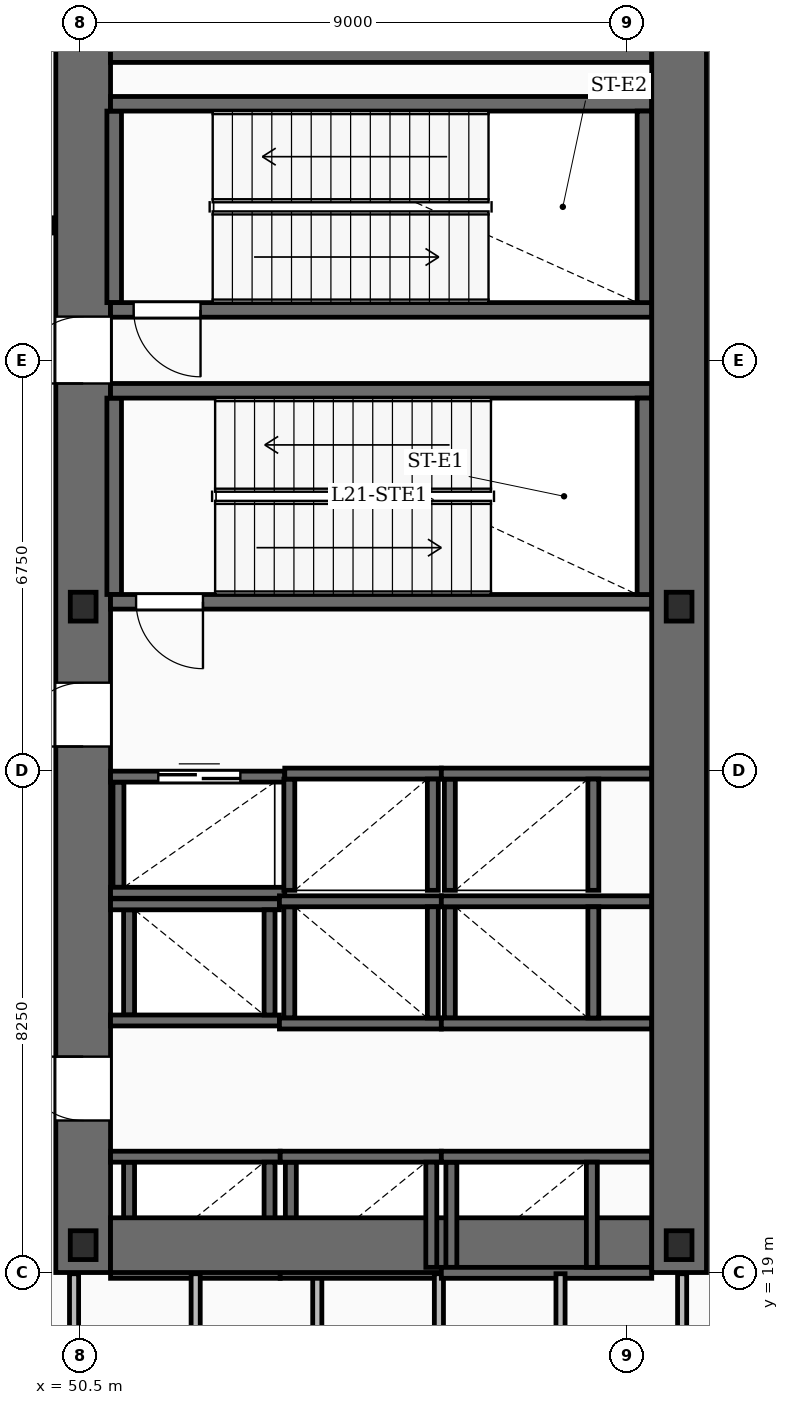
"""IFC4 building model, lengths in metres.
Left out: names, types, materials, properties, quantities, classifications, styles, units other than length and angle.
Written with IfcOpenShell. Run it as: python <this file> out.ifc"""

import sys

from ifc_helpers import new_model, si_unit, direction, frame, frame_2d, origin, origin_2d, place, context, subcontext, project, spatial, rectangle, i_section, extrude, element, fill, save


model = new_model("IFC4")
c1 = context("Model", 3, precision=1e-05, world=origin(), true_north=direction((0.0, 1.0)))
c2 = subcontext(c1, "Body", "Model", "MODEL_VIEW")
j1 = project(units=[si_unit("LENGTHUNIT", "METRE"), si_unit("PLANEANGLEUNIT", "RADIAN")], contexts=[c1])
p1 = place(None, origin())
s1 = spatial("IfcSite", under=j1, at=p1, CompositionType="ELEMENT")
p2 = place(p1, origin())
s2 = spatial("IfcBuilding", under=s1, at=p2, CompositionType="ELEMENT")
p3 = place(p2, frame((0.0, 0.0, 94.5)))
s3 = spatial("IfcBuildingStorey", under=s2, at=p3, CompositionType="ELEMENT", Elevation=94.5)
p4 = place(p3, frame((50.55, 19.0, -0.42), z_axis=(0.0, 0.0, 1.0), x_axis=(0.0, 1.0, 0.0)))
e1 = element("IfcWall", 1, at=p4, inside=s3, PredefinedType="SHEAR", context=c2, shape_type="SweptSolid", body=[
    extrude(rectangle(XDim=20.8, YDim=0.9, at=frame_2d((10.4, 0.0))), origin(), (0.0, 0.0, 1.0), 5.17),
])
p5 = place(p4, frame((2.5, 0.0, 0.42)))
e2 = element("IfcOpeningElement", 2, at=p5, cuts=e1, PredefinedType="OPENING", context=c2, shape_type="SweptSolid", body=[
    extrude(rectangle(XDim=1.05, YDim=2.15, at=frame_2d((0.525, 1.075))), frame((0.0, 0.46, 0.0), z_axis=(0.0, -1.0, 0.0), x_axis=(1.0, 0.0, 0.0)), (0.0, 0.0, 1.0), 0.92),
])
p6 = place(p4, frame((8.65, 0.0, 0.42)))
e3 = element("IfcOpeningElement", 3, at=p6, cuts=e1, PredefinedType="OPENING", context=c2, shape_type="SweptSolid", body=[
    extrude(rectangle(XDim=1.05, YDim=2.15, at=frame_2d((0.525, 1.075))), frame((0.0, 0.46, 0.0), z_axis=(0.0, -1.0, 0.0), x_axis=(1.0, 0.0, 0.0)), (0.0, 0.0, 1.0), 0.92),
])
p7 = place(p4, frame((14.62, 0.0, 0.42)))
e4 = element("IfcOpeningElement", 4, at=p7, cuts=e1, PredefinedType="OPENING", context=c2, shape_type="SweptSolid", body=[
    extrude(rectangle(XDim=1.1, YDim=2.15, at=frame_2d((0.55, 1.075))), frame((0.0, 0.46, 0.0), z_axis=(0.0, -1.0, 0.0), x_axis=(1.0, 0.0, 0.0)), (0.0, 0.0, 1.0), 0.92),
])
p8 = place(p3, frame((60.35, 19.0, -0.42), z_axis=(0.0, 0.0, 1.0), x_axis=(0.0, 1.0, 0.0)))
e5 = element("IfcWall", 5, at=p8, inside=s3, PredefinedType="SHEAR", context=c2, shape_type="SweptSolid", body=[
    extrude(rectangle(XDim=20.8, YDim=0.9, at=frame_2d((10.4, 0.0))), origin(), (0.0, 0.0, 1.0), 5.17),
])
for number, where, z_axis, x_axis in (
    (6, (51.0, 19.45, -0.42), (0.0, 0.0, 1.0), (1.0, 0.0, 0.0)),
    (7, (51.0, 39.35, -0.42), (0.0, 0.0, 1.0), (1.0, 0.0, 0.0)),
):
    element("IfcWall", number, at=place(p3, frame(where, z_axis=z_axis, x_axis=x_axis)), inside=s3, PredefinedType="SHEAR", context=c2, shape_type="SweptSolid", body=[
        extrude(rectangle(XDim=8.9, YDim=0.9, at=frame_2d((4.45, 0.0))), origin(), (0.0, 0.0, 1.0), 5.17),
    ])
for number, where, z_axis, x_axis in (
    (8, (50.55, 19.45, -0.42), (0.0, 0.0, 1.0), (1.0, 0.0, 0.0)),
    (9, (60.35, 19.45, -0.42), (0.0, 0.0, 1.0), (1.0, 0.0, 0.0)),
    (10, (50.55, 29.95, -0.42), (0.0, 0.0, 1.0), (1.0, 0.0, 0.0)),
    (11, (60.35, 29.95, -0.42), (0.0, 0.0, 1.0), (1.0, 0.0, 0.0)),
):
    element("IfcColumn", number, at=place(p3, frame(where, z_axis=z_axis, x_axis=x_axis)), inside=s3, PredefinedType="COLUMN", context=c2, shape_type="SweptSolid", body=[
        extrude(i_section(OverallWidth=0.424, OverallDepth=0.474, WebThickness=0.048, FlangeThickness=0.077, FilletRadius=0.02, at=origin_2d()), origin(), (0.0, 0.0, 1.0), 5.17),
    ])
p9 = place(p3, frame((59.9, 30.03, 0.0), z_axis=(0.0, 0.0, 1.0), x_axis=(-1.0, 0.0, 0.0)))
e12 = element("IfcWall", 12, at=p9, inside=s3, PredefinedType="SOLIDWALL", context=c2, shape_type="SweptSolid", body=[
    extrude(rectangle(XDim=8.9, YDim=0.24, at=frame_2d((4.45, 0.0))), origin(), (0.0, 0.0, 1.0), 4.75),
])
p10 = place(p9, frame((7.38, 0.0, 0.0)))
e13 = element("IfcOpeningElement", 13, at=p10, cuts=e12, PredefinedType="OPENING", context=c2, shape_type="SweptSolid", body=[
    extrude(rectangle(XDim=1.1, YDim=2.15, at=frame_2d((0.55, 1.075))), frame((0.0, 0.13, 0.0), z_axis=(0.0, -1.0, 0.0), x_axis=(1.0, 0.0, 0.0)), (0.0, 0.0, 1.0), 0.26),
])
p11 = place(p3, frame((51.0, 33.5, 0.0), z_axis=(0.0, 0.0, 1.0), x_axis=(1.0, 0.0, 0.0)))
e14 = element("IfcWall", 14, at=p11, inside=s3, PredefinedType="SOLIDWALL", context=c2, shape_type="SweptSolid", body=[
    extrude(rectangle(XDim=8.9, YDim=0.24, at=frame_2d((4.45, 0.0))), origin(), (0.0, 0.0, 1.0), 4.75),
])
for number, where, z_axis, x_axis in (
    (15, (51.06, 30.15, 0.0), (0.0, 0.0, 1.0), (0.0, 1.0, 0.0)),
    (16, (59.78, 30.15, 0.0), (0.0, 0.0, 1.0), (0.0, 1.0, 0.0)),
):
    element("IfcWall", number, at=place(p3, frame(where, z_axis=z_axis, x_axis=x_axis)), inside=s3, PredefinedType="SOLIDWALL", context=c2, shape_type="SweptSolid", body=[
        extrude(rectangle(XDim=3.23, YDim=0.24, at=frame_2d((1.615, 0.0))), origin(), (0.0, 0.0, 1.0), 4.75),
    ])
p12 = place(p3, frame((59.9, 34.83, 0.0), z_axis=(0.0, 0.0, 1.0), x_axis=(-1.0, 0.0, 0.0)))
e17 = element("IfcWall", 17, at=p12, inside=s3, PredefinedType="SOLIDWALL", context=c2, shape_type="SweptSolid", body=[
    extrude(rectangle(XDim=8.9, YDim=0.24, at=frame_2d((4.45, 0.0))), origin(), (0.0, 0.0, 1.0), 4.75),
])
p13 = place(p12, frame((7.42, 0.0, 0.0)))
e18 = element("IfcOpeningElement", 18, at=p13, cuts=e17, PredefinedType="OPENING", context=c2, shape_type="SweptSolid", body=[
    extrude(rectangle(XDim=1.1, YDim=2.15, at=frame_2d((0.55, 1.075))), frame((0.0, 0.13, 0.0), z_axis=(0.0, -1.0, 0.0), x_axis=(1.0, 0.0, 0.0)), (0.0, 0.0, 1.0), 0.26),
])
p14 = place(p3, frame((51.0, 38.22, 0.0), z_axis=(0.0, 0.0, 1.0), x_axis=(1.0, 0.0, 0.0)))
e19 = element("IfcWall", 19, at=p14, inside=s3, PredefinedType="SOLIDWALL", context=c2, shape_type="SweptSolid", body=[
    extrude(rectangle(XDim=8.9, YDim=0.24, at=frame_2d((4.45, 0.0))), origin(), (0.0, 0.0, 1.0), 4.75),
])
for number, where, z_axis, x_axis in (
    (20, (51.06, 34.95, 0.0), (0.0, 0.0, 1.0), (0.0, 1.0, 0.0)),
    (21, (59.78, 34.95, 0.0), (0.0, 0.0, 1.0), (0.0, 1.0, 0.0)),
):
    element("IfcWall", number, at=place(p3, frame(where, z_axis=z_axis, x_axis=x_axis)), inside=s3, PredefinedType="SOLIDWALL", context=c2, shape_type="SweptSolid", body=[
        extrude(rectangle(XDim=3.15, YDim=0.24, at=frame_2d((1.575, 0.0))), origin(), (0.0, 0.0, 1.0), 4.75),
    ])
for number, where, z_axis, x_axis in (
    (22, (51.0, 20.905, 0.0), (0.0, 0.0, 1.0), (1.0, 0.0, 0.0)),
    (23, (51.0, 18.995, 0.0), (0.0, 0.0, 1.0), (1.0, 0.0, 0.0)),
):
    element("IfcWall", number, at=place(p3, frame(where, z_axis=z_axis, x_axis=x_axis)), inside=s3, PredefinedType="SOLIDWALL", context=c2, shape_type="SweptSolid", body=[
        extrude(rectangle(XDim=2.79, YDim=0.18, at=frame_2d((1.395, 0.0))), origin(), (0.0, 0.0, 1.0), 4.75),
    ])
for number, where, z_axis, x_axis in (
    (24, (51.305, 19.085, 0.0), (0.0, 0.0, 1.0), (0.0, 1.0, 0.0)),
    (25, (53.615, 19.085, 0.0), (0.0, 0.0, 1.0), (0.0, 1.0, 0.0)),
):
    element("IfcWall", number, at=place(p3, frame(where, z_axis=z_axis, x_axis=x_axis)), inside=s3, PredefinedType="SOLIDWALL", context=c2, shape_type="SweptSolid", body=[
        extrude(rectangle(XDim=1.73, YDim=0.18, at=frame_2d((0.865, 0.0))), origin(), (0.0, 0.0, 1.0), 4.75),
    ])
for number, where, z_axis, x_axis in (
    (26, (53.79, 20.905, 0.0), (0.0, 0.0, 1.0), (1.0, 0.0, 0.0)),
    (27, (53.79, 18.995, 0.0), (0.0, 0.0, 1.0), (1.0, 0.0, 0.0)),
):
    element("IfcWall", number, at=place(p3, frame(where, z_axis=z_axis, x_axis=x_axis)), inside=s3, PredefinedType="SOLIDWALL", context=c2, shape_type="SweptSolid", body=[
        extrude(rectangle(XDim=2.65, YDim=0.18, at=frame_2d((1.325, 0.0))), origin(), (0.0, 0.0, 1.0), 4.75),
    ])
for number, where, z_axis, x_axis in (
    (28, (53.965, 19.085, 0.0), (0.0, 0.0, 1.0), (0.0, 1.0, 0.0)),
    (29, (56.275, 19.085, 0.0), (0.0, 0.0, 1.0), (0.0, 1.0, 0.0)),
):
    element("IfcWall", number, at=place(p3, frame(where, z_axis=z_axis, x_axis=x_axis)), inside=s3, PredefinedType="SOLIDWALL", context=c2, shape_type="SweptSolid", body=[
        extrude(rectangle(XDim=1.73, YDim=0.18, at=frame_2d((0.865, 0.0))), origin(), (0.0, 0.0, 1.0), 4.75),
    ])
for number, where, z_axis, x_axis in (
    (30, (56.44, 20.905, 0.0), (0.0, 0.0, 1.0), (1.0, 0.0, 0.0)),
    (31, (56.44, 18.995, 0.0), (0.0, 0.0, 1.0), (1.0, 0.0, 0.0)),
):
    element("IfcWall", number, at=place(p3, frame(where, z_axis=z_axis, x_axis=x_axis)), inside=s3, PredefinedType="SOLIDWALL", context=c2, shape_type="SweptSolid", body=[
        extrude(rectangle(XDim=3.46, YDim=0.18, at=frame_2d((1.73, 0.0))), origin(), (0.0, 0.0, 1.0), 4.75),
    ])
for number, where, z_axis, x_axis in (
    (32, (56.605, 19.085, 0.0), (0.0, 0.0, 1.0), (0.0, 1.0, 0.0)),
    (33, (58.915, 19.085, 0.0), (0.0, 0.0, 1.0), (0.0, 1.0, 0.0)),
):
    element("IfcWall", number, at=place(p3, frame(where, z_axis=z_axis, x_axis=x_axis)), inside=s3, PredefinedType="SOLIDWALL", context=c2, shape_type="SweptSolid", body=[
        extrude(rectangle(XDim=1.73, YDim=0.18, at=frame_2d((0.865, 0.0))), origin(), (0.0, 0.0, 1.0), 4.75),
    ])
for number, where, z_axis, x_axis in (
    (34, (51.0, 25.055, 0.0), (0.0, 0.0, 1.0), (1.0, 0.0, 0.0)),
    (35, (51.0, 23.145, 0.0), (0.0, 0.0, 1.0), (1.0, 0.0, 0.0)),
):
    element("IfcWall", number, at=place(p3, frame(where, z_axis=z_axis, x_axis=x_axis)), inside=s3, PredefinedType="SOLIDWALL", context=c2, shape_type="SweptSolid", body=[
        extrude(rectangle(XDim=2.778, YDim=0.18, at=frame_2d((1.389, 0.0))), origin(), (0.0, 0.0, 1.0), 4.75),
    ])
for number, where, z_axis, x_axis in (
    (36, (51.305, 23.235, 0.0), (0.0, 0.0, 1.0), (0.0, 1.0, 0.0)),
    (37, (53.615, 23.235, 0.0), (0.0, 0.0, 1.0), (0.0, 1.0, 0.0)),
):
    element("IfcWall", number, at=place(p3, frame(where, z_axis=z_axis, x_axis=x_axis)), inside=s3, PredefinedType="SOLIDWALL", context=c2, shape_type="SweptSolid", body=[
        extrude(rectangle(XDim=1.73, YDim=0.18, at=frame_2d((0.865, 0.0))), origin(), (0.0, 0.0, 1.0), 4.75),
    ])
for number, where, z_axis, x_axis in (
    (38, (53.778, 25.105, 0.0), (0.0, 0.0, 1.0), (1.0, 0.0, 0.0)),
    (39, (53.778, 23.095, 0.0), (0.0, 0.0, 1.0), (1.0, 0.0, 0.0)),
):
    element("IfcWall", number, at=place(p3, frame(where, z_axis=z_axis, x_axis=x_axis)), inside=s3, PredefinedType="SOLIDWALL", context=c2, shape_type="SweptSolid", body=[
        extrude(rectangle(XDim=2.662, YDim=0.18, at=frame_2d((1.331, 0.0))), origin(), (0.0, 0.0, 1.0), 4.75),
    ])
for number, where, z_axis, x_axis in (
    (40, (53.94, 23.185, 0.0), (0.0, 0.0, 1.0), (0.0, 1.0, 0.0)),
    (41, (56.3, 23.185, 0.0), (0.0, 0.0, 1.0), (0.0, 1.0, 0.0)),
):
    element("IfcWall", number, at=place(p3, frame(where, z_axis=z_axis, x_axis=x_axis)), inside=s3, PredefinedType="SOLIDWALL", context=c2, shape_type="SweptSolid", body=[
        extrude(rectangle(XDim=1.83, YDim=0.18, at=frame_2d((0.915, 0.0))), origin(), (0.0, 0.0, 1.0), 4.75),
    ])
for number, where, z_axis, x_axis in (
    (42, (56.44, 25.105, 0.0), (0.0, 0.0, 1.0), (1.0, 0.0, 0.0)),
    (43, (56.44, 23.095, 0.0), (0.0, 0.0, 1.0), (1.0, 0.0, 0.0)),
):
    element("IfcWall", number, at=place(p3, frame(where, z_axis=z_axis, x_axis=x_axis)), inside=s3, PredefinedType="SOLIDWALL", context=c2, shape_type="SweptSolid", body=[
        extrude(rectangle(XDim=3.46, YDim=0.18, at=frame_2d((1.73, 0.0))), origin(), (0.0, 0.0, 1.0), 4.75),
    ])
for number, where, z_axis, x_axis in (
    (44, (56.58, 23.185, 0.0), (0.0, 0.0, 1.0), (0.0, 1.0, 0.0)),
    (45, (58.94, 23.185, 0.0), (0.0, 0.0, 1.0), (0.0, 1.0, 0.0)),
):
    element("IfcWall", number, at=place(p3, frame(where, z_axis=z_axis, x_axis=x_axis)), inside=s3, PredefinedType="SOLIDWALL", context=c2, shape_type="SweptSolid", body=[
        extrude(rectangle(XDim=1.83, YDim=0.18, at=frame_2d((0.915, 0.0))), origin(), (0.0, 0.0, 1.0), 4.75),
    ])
p15 = place(p3, frame((53.865, 27.205, 0.0), z_axis=(0.0, 0.0, 1.0), x_axis=(1.0, 0.0, 0.0)))
e46 = element("IfcWall", 46, at=p15, inside=s3, PredefinedType="SOLIDWALL", context=c2, shape_type="SweptSolid", body=[
    extrude(rectangle(XDim=2.575, YDim=0.18, at=frame_2d((1.288, 0.0))), origin(), (0.0, 0.0, 1.0), 4.75),
])
for number, where, z_axis, x_axis in (
    (47, (53.94, 25.285, 0.0), (0.0, 0.0, 1.0), (0.0, 1.0, 0.0)),
    (48, (56.3, 25.285, 0.0), (0.0, 0.0, 1.0), (0.0, 1.0, 0.0)),
):
    element("IfcWall", number, at=place(p3, frame(where, z_axis=z_axis, x_axis=x_axis)), inside=s3, PredefinedType="SOLIDWALL", context=c2, shape_type="SweptSolid", body=[
        extrude(rectangle(XDim=1.83, YDim=0.18, at=frame_2d((0.915, 0.0))), origin(), (0.0, 0.0, 1.0), 4.75),
    ])
p16 = place(p3, frame((56.44, 27.205, 0.0), z_axis=(0.0, 0.0, 1.0), x_axis=(1.0, 0.0, 0.0)))
e49 = element("IfcWall", 49, at=p16, inside=s3, PredefinedType="SOLIDWALL", context=c2, shape_type="SweptSolid", body=[
    extrude(rectangle(XDim=3.46, YDim=0.18, at=frame_2d((1.73, 0.0))), origin(), (0.0, 0.0, 1.0), 4.75),
])
for number, where, z_axis, x_axis in (
    (50, (56.58, 25.285, 0.0), (0.0, 0.0, 1.0), (0.0, 1.0, 0.0)),
    (51, (58.94, 25.285, 0.0), (0.0, 0.0, 1.0), (0.0, 1.0, 0.0)),
):
    element("IfcWall", number, at=place(p3, frame(where, z_axis=z_axis, x_axis=x_axis)), inside=s3, PredefinedType="SOLIDWALL", context=c2, shape_type="SweptSolid", body=[
        extrude(rectangle(XDim=1.83, YDim=0.18, at=frame_2d((0.915, 0.0))), origin(), (0.0, 0.0, 1.0), 4.75),
    ])
p17 = place(p3, frame((51.0, 27.155, 0.0), z_axis=(0.0, 0.0, 1.0), x_axis=(1.0, 0.0, 0.0)))
e52 = element("IfcWall", 52, at=p17, inside=s3, PredefinedType="SOLIDWALL", context=c2, shape_type="SweptSolid", body=[
    extrude(rectangle(XDim=2.865, YDim=0.18, at=frame_2d((1.433, 0.0))), origin(), (0.0, 0.0, 1.0), 4.75),
])
p18 = place(p17, frame((0.785, 0.0, 0.0)))
e53 = element("IfcOpeningElement", 53, at=p18, cuts=e52, PredefinedType="OPENING", context=c2, shape_type="SweptSolid", body=[
    extrude(rectangle(XDim=1.35, YDim=2.3, at=frame_2d((0.675, 1.15))), frame((0.0, 0.1, 0.0), z_axis=(0.0, -1.0, 0.0), x_axis=(1.0, 0.0, 0.0)), (0.0, 0.0, 1.0), 0.2),
])
p19 = place(p3, frame((51.0, 25.245, 0.0), z_axis=(0.0, 0.0, 1.0), x_axis=(1.0, 0.0, 0.0)))
e54 = element("IfcWall", 54, at=p19, inside=s3, PredefinedType="SOLIDWALL", context=c2, shape_type="SweptSolid", body=[
    extrude(rectangle(XDim=2.865, YDim=0.18, at=frame_2d((1.433, 0.0))), origin(), (0.0, 0.0, 1.0), 4.75),
])
p20 = place(p3, frame((51.13, 25.335, 0.0), z_axis=(0.0, 0.0, 1.0), x_axis=(0.0, 1.0, 0.0)))
e55 = element("IfcWall", 55, at=p20, inside=s3, PredefinedType="SOLIDWALL", context=c2, shape_type="SweptSolid", body=[
    extrude(rectangle(XDim=1.73, YDim=0.18, at=frame_2d((0.865, 0.0))), origin(), (0.0, 0.0, 1.0), 4.75),
])
for number, where, z_axis, x_axis in (
    (56, (52.4, 15.4, 0.0), (0.0, 0.0, 1.0), (0.0, 1.0, 0.0)),
    (57, (54.4, 15.4, 0.0), (0.0, 0.0, 1.0), (0.0, 1.0, 0.0)),
    (58, (56.4, 15.4, 0.0), (0.0, 0.0, 1.0), (0.0, 1.0, 0.0)),
    (59, (58.4, 15.4, 0.0), (0.0, 0.0, 1.0), (0.0, 1.0, 0.0)),
    (60, (50.4, 15.4, 0.0), (0.0, 0.0, 1.0), (0.0, 1.0, 0.0)),
):
    element("IfcWall", number, at=place(p3, frame(where, z_axis=z_axis, x_axis=x_axis)), inside=s3, PredefinedType="PARTITIONING", context=c2, shape_type="SweptSolid", body=[
        extrude(rectangle(XDim=3.58, YDim=0.15, at=frame_2d((1.79, 0.0))), origin(), (0.0, 0.0, 1.0), 3.81),
    ])
p21 = place(p3, frame((60.4, 15.4, 0.0), z_axis=(0.0, 0.0, 1.0), x_axis=(0.0, 1.0, 0.0)))
e61 = element("IfcWall", 61, at=p21, inside=s3, PredefinedType="PARTITIONING", context=c2, shape_type="SweptSolid", body=[
    extrude(rectangle(XDim=3.58, YDim=0.15, at=frame_2d((1.79, 0.0))), origin(), (0.0, 0.0, 1.0), 2.8),
])
p22 = place(p3, frame((24.85, 36.22, 0.0), z_axis=(0.0, 0.0, 1.0), x_axis=(1.0, 0.0, 0.0)))
e62 = element("IfcWall", 62, at=p22, inside=s3, PredefinedType="SOLIDWALL", context=c2, shape_type="SweptSolid", body=[
    extrude(rectangle(XDim=25.2, YDim=0.25, at=frame_2d((12.6, 0.0))), origin(), (0.0, 0.0, 1.0), 3.81),
])
p23 = place(p22, frame((0.55, 0.0, 0.0)))
e63 = element("IfcOpeningElement", 63, at=p23, cuts=e62, PredefinedType="OPENING", context=c2, shape_type="SweptSolid", body=[
    extrude(rectangle(XDim=1.2, YDim=2.2, at=frame_2d((0.6, 1.1))), frame((0.0, 0.135, 0.0), z_axis=(0.0, -1.0, 0.0), x_axis=(1.0, 0.0, 0.0)), (0.0, 0.0, 1.0), 0.27),
])
p24 = place(p5, origin())
e64 = element("IfcDoor", 64, at=p24, inside=s3, OperationType="SINGLE_SWING_RIGHT", PredefinedType="DOOR", context=c2, shape_type="SweptSolid", body=[
    extrude(rectangle(XDim=1.05, YDim=2.15, at=frame_2d((0.525, 1.075))), frame((0.0, 0.025, 0.0), z_axis=(0.0, -1.0, 0.0), x_axis=(1.0, 0.0, 0.0)), (0.0, 0.0, 1.0), 0.05),
])
fill(e2, e64)
p25 = place(p6, origin())
e65 = element("IfcDoor", 65, at=p25, inside=s3, OperationType="SINGLE_SWING_LEFT", PredefinedType="DOOR", context=c2, shape_type="SweptSolid", body=[
    extrude(rectangle(XDim=1.05, YDim=2.15, at=frame_2d((0.525, 1.075))), frame((0.0, 0.025, 0.0), z_axis=(0.0, -1.0, 0.0), x_axis=(1.0, 0.0, 0.0)), (0.0, 0.0, 1.0), 0.05),
])
fill(e3, e65)
p26 = place(p7, origin())
e66 = element("IfcDoor", 66, at=p26, inside=s3, OperationType="SINGLE_SWING_LEFT", PredefinedType="DOOR", context=c2, shape_type="SweptSolid", body=[
    extrude(rectangle(XDim=1.1, YDim=2.15, at=frame_2d((0.55, 1.075))), frame((0.0, 0.025, 0.0), z_axis=(0.0, -1.0, 0.0), x_axis=(1.0, 0.0, 0.0)), (0.0, 0.0, 1.0), 0.05),
])
fill(e4, e66)
p27 = place(p10, origin())
e67 = element("IfcDoor", 67, at=p27, inside=s3, OperationType="SINGLE_SWING_LEFT", PredefinedType="DOOR", context=c2, shape_type="SweptSolid", body=[
    extrude(rectangle(XDim=1.1, YDim=2.15, at=frame_2d((0.55, 1.075))), frame((0.0, 0.025, 0.0), z_axis=(0.0, -1.0, 0.0), x_axis=(1.0, 0.0, 0.0)), (0.0, 0.0, 1.0), 0.05),
])
fill(e13, e67)
p28 = place(p13, origin())
e68 = element("IfcDoor", 68, at=p28, inside=s3, OperationType="SINGLE_SWING_LEFT", PredefinedType="DOOR", context=c2, shape_type="SweptSolid", body=[
    extrude(rectangle(XDim=1.1, YDim=2.15, at=frame_2d((0.55, 1.075))), frame((0.0, 0.025, 0.0), z_axis=(0.0, -1.0, 0.0), x_axis=(1.0, 0.0, 0.0)), (0.0, 0.0, 1.0), 0.05),
])
fill(e18, e68)
p29 = place(p18, origin())
e69 = element("IfcDoor", 69, at=p29, inside=s3, OperationType="DOUBLE_DOOR_SLIDING", PredefinedType="DOOR", context=c2, shape_type="SweptSolid", body=[
    extrude(rectangle(XDim=1.35, YDim=2.3, at=frame_2d((0.675, 1.15))), frame((0.0, 0.025, 0.0), z_axis=(0.0, -1.0, 0.0), x_axis=(1.0, 0.0, 0.0)), (0.0, 0.0, 1.0), 0.05),
])
fill(e53, e69)
save(model, sys.argv[1])
